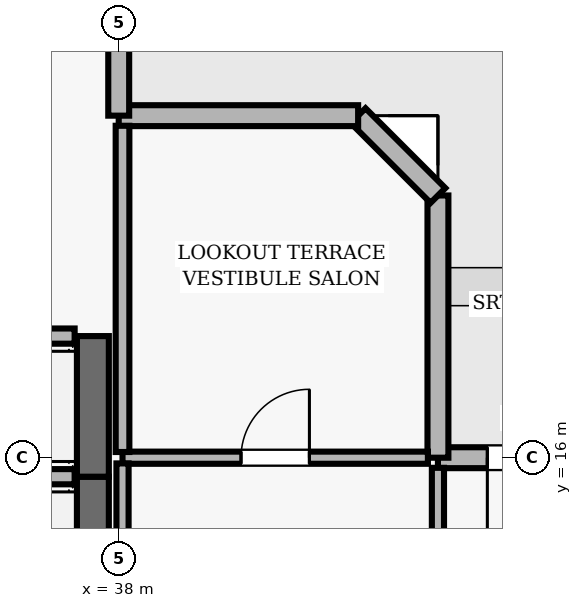
"""IFC4 building model, lengths in metres.
Left out: names, types, materials, properties, quantities, classifications, styles, units other than length and angle.
Written with IfcOpenShell. Run it as: python <this file> out.ifc"""

import sys

from ifc_helpers import new_model, si_unit, direction, frame, frame_2d, origin, place, context, subcontext, project, spatial, rectangle, extrude, element, fill, save


model = new_model("IFC4")
c1 = context("Model", 3, precision=1e-05, world=origin(), true_north=direction((0.0, 1.0)))
c2 = subcontext(c1, "Body", "Model", "MODEL_VIEW")
j1 = project(units=[si_unit("LENGTHUNIT", "METRE"), si_unit("PLANEANGLEUNIT", "RADIAN")], contexts=[c1])
p1 = place(None, origin())
s1 = spatial("IfcSite", under=j1, at=p1, CompositionType="ELEMENT")
p2 = place(p1, origin())
s2 = spatial("IfcBuilding", under=s1, at=p2, CompositionType="ELEMENT")
p3 = place(p2, frame((0.0, 0.0, 311.7)))
s3 = spatial("IfcBuildingStorey", under=s2, at=p3, CompositionType="ELEMENT", Elevation=311.7)
p4 = place(p3, frame((57.3, 16.0, 0.0), z_axis=(0.0, 0.0, 1.0), x_axis=(-1.0, 0.0, 0.0)))
e1 = element("IfcWall", 1, at=p4, inside=s3, PredefinedType="SOLIDWALL", context=c2, shape_type="SweptSolid", body=[
    extrude(rectangle(XDim=15.1, YDim=0.275, at=frame_2d((7.55, 0.0))), origin(), (0.0, 0.0, 1.0), 4.74),
])
p5 = place(p4, frame((7.25, 0.0, 0.0)))
e2 = element("IfcOpeningElement", 2, at=p5, cuts=e1, PredefinedType="OPENING", context=c2, shape_type="SweptSolid", body=[
    extrude(rectangle(XDim=1.0, YDim=2.2, at=frame_2d((0.5, 1.1))), frame((0.0, 0.147, 0.0), z_axis=(0.0, -1.0, 0.0), x_axis=(1.0, 0.0, 0.0)), (0.0, 0.0, 1.0), 0.295),
])
p6 = place(p4, frame((13.1, 0.0, 0.0)))
e3 = element("IfcOpeningElement", 3, at=p6, cuts=e1, PredefinedType="OPENING", context=c2, shape_type="SweptSolid", body=[
    extrude(rectangle(XDim=1.35, YDim=2.2, at=frame_2d((0.675, 1.1))), frame((0.0, 0.147, 0.0), z_axis=(0.0, -1.0, 0.0), x_axis=(1.0, 0.0, 0.0)), (0.0, 0.0, 1.0), 0.295),
])
p7 = place(p4, frame((2.375, 0.0, 0.9)))
e4 = element("IfcOpeningElement", 4, at=p7, cuts=e1, PredefinedType="OPENING", context=c2, shape_type="SweptSolid", body=[
    extrude(rectangle(XDim=2.8, YDim=1.8, at=frame_2d((1.4, 0.9))), frame((0.0, 0.147, 0.0), z_axis=(0.0, -1.0, 0.0), x_axis=(1.0, 0.0, 0.0)), (0.0, 0.0, 1.0), 0.295),
])
p8 = place(p3, frame((42.2, 16.0, 0.0), z_axis=(0.0, 0.0, 1.0), x_axis=(0.0, 1.0, 0.0)))
e5 = element("IfcWall", 5, at=p8, inside=s3, PredefinedType="SOLIDWALL", context=c2, shape_type="SweptSolid", body=[
    extrude(rectangle(XDim=3.45, YDim=0.275, at=frame_2d((1.725, 0.0))), origin(), (0.0, 0.0, 1.0), 4.74),
])
p9 = place(p3, frame((42.2, 19.45, 0.0), z_axis=(0.0, 0.0, 1.0), x_axis=(-0.707106781187, 0.707106781187, 0.0)))
e6 = element("IfcWall", 6, at=p9, inside=s3, PredefinedType="SOLIDWALL", context=c2, shape_type="SweptSolid", body=[
    extrude(rectangle(XDim=1.485, YDim=0.275, at=frame_2d((0.743, 0.0))), origin(), (0.0, 0.0, 1.0), 4.74),
])
p10 = place(p3, frame((41.15, 20.5, 0.0), z_axis=(0.0, 0.0, 1.0), x_axis=(-1.0, 0.0, 0.0)))
e7 = element("IfcWall", 7, at=p10, inside=s3, PredefinedType="SOLIDWALL", context=c2, shape_type="SweptSolid", body=[
    extrude(rectangle(XDim=3.15, YDim=0.275, at=frame_2d((1.575, 0.0))), origin(), (0.0, 0.0, 1.0), 4.74),
])
p11 = place(p3, frame((38.0, 20.5, 0.0), z_axis=(0.0, 0.0, 1.0), x_axis=(0.0, 1.0, 0.0)))
e8 = element("IfcWall", 8, at=p11, inside=s3, PredefinedType="SOLIDWALL", context=c2, shape_type="SweptSolid", body=[
    extrude(rectangle(XDim=14.8, YDim=0.275, at=frame_2d((7.4, 0.0))), origin(), (0.0, 0.0, 1.0), 4.74),
])
p12 = place(p11, frame((6.5, 0.0, 0.0)))
e9 = element("IfcOpeningElement", 9, at=p12, cuts=e8, PredefinedType="OPENING", context=c2, shape_type="SweptSolid", body=[
    extrude(rectangle(XDim=1.0, YDim=2.2, at=frame_2d((0.5, 1.1))), frame((0.0, 0.147, 0.0), z_axis=(0.0, -1.0, 0.0), x_axis=(1.0, 0.0, 0.0)), (0.0, 0.0, 1.0), 0.295),
])
p13 = place(p11, frame((10.5, 0.0, 0.9)))
e10 = element("IfcOpeningElement", 10, at=p13, cuts=e8, PredefinedType="OPENING", context=c2, shape_type="SweptSolid", body=[
    extrude(rectangle(XDim=1.2, YDim=1.6, at=frame_2d((0.6, 0.8))), frame((0.0, 0.147, 0.0), z_axis=(0.0, -1.0, 0.0), x_axis=(1.0, 0.0, 0.0)), (0.0, 0.0, 1.0), 0.295),
])
p14 = place(p3, frame((37.66, 13.9, 0.0), z_axis=(0.0, 0.0, 1.0), x_axis=(0.0, 1.0, 0.0)))
e11 = element("IfcWall", 11, at=p14, inside=s3, PredefinedType="SHEAR", context=c2, shape_type="SweptSolid", body=[
    extrude(rectangle(XDim=1.85, YDim=0.42, at=frame_2d((0.925, 0.0))), origin(), (0.0, 0.0, 1.0), 4.74),
])
p15 = place(p3, frame((37.42, 15.75, 0.0), z_axis=(0.0, 0.0, 1.0), x_axis=(-1.0, 0.0, 0.0)))
e12 = element("IfcWall", 12, at=p15, inside=s3, PredefinedType="SOLIDWALL", context=c2, shape_type="SweptSolid", body=[
    extrude(rectangle(XDim=2.14, YDim=0.2, at=frame_2d((1.07, 0.0))), origin(), (0.0, 0.0, 1.0), 4.74),
])
p16 = place(p3, frame((37.66, 15.75, 0.0), z_axis=(0.0, 0.0, 1.0), x_axis=(0.0, 1.0, 0.0)))
e13 = element("IfcWall", 13, at=p16, inside=s3, PredefinedType="SHEAR", context=c2, shape_type="SweptSolid", body=[
    extrude(rectangle(XDim=1.85, YDim=0.42, at=frame_2d((0.925, 0.0))), origin(), (0.0, 0.0, 1.0), 4.74),
])
p17 = place(p3, frame((37.42, 17.6, 0.0), z_axis=(0.0, 0.0, 1.0), x_axis=(-1.0, 0.0, 0.0)))
e14 = element("IfcWall", 14, at=p17, inside=s3, PredefinedType="SOLIDWALL", context=c2, shape_type="SweptSolid", body=[
    extrude(rectangle(XDim=2.14, YDim=0.2, at=frame_2d((1.07, 0.0))), origin(), (0.0, 0.0, 1.0), 4.74),
])
p18 = place(p3, frame((38.05, 16.0, 0.0), z_axis=(0.0, 0.0, 1.0), x_axis=(1.0, 0.0, 0.0)))
e15 = element("IfcWall", 15, at=p18, inside=s3, PredefinedType="PARTITIONING", context=c2, shape_type="SweptSolid", body=[
    extrude(rectangle(XDim=4.018, YDim=0.16, at=frame_2d((2.009, 0.0))), origin(), (0.0, 0.0, 1.0), 4.74),
])
p19 = place(p18, frame((1.559, 0.0, 0.0)))
e16 = element("IfcOpeningElement", 16, at=p19, cuts=e15, PredefinedType="OPENING", context=c2, shape_type="SweptSolid", body=[
    extrude(rectangle(XDim=0.9, YDim=2.1, at=frame_2d((0.45, 1.05))), frame((0.0, 0.09, 0.0), z_axis=(0.0, -1.0, 0.0), x_axis=(1.0, 0.0, 0.0)), (0.0, 0.0, 1.0), 0.18),
])
p20 = place(p3, frame((38.05, 15.925, 0.0), z_axis=(0.0, 0.0, 1.0), x_axis=(0.0, -1.0, 0.0)))
e17 = element("IfcWall", 17, at=p20, inside=s3, PredefinedType="PARTITIONING", context=c2, shape_type="SweptSolid", body=[
    extrude(rectangle(XDim=6.375, YDim=0.16, at=frame_2d((3.188, 0.0))), origin(), (0.0, 0.0, 1.0), 4.271),
])
p21 = place(p3, frame((38.05, 20.367, 0.0), z_axis=(0.0, 0.0, 1.0), x_axis=(0.0, -1.0, 0.0)))
e18 = element("IfcWall", 18, at=p21, inside=s3, PredefinedType="PARTITIONING", context=c2, shape_type="SweptSolid", body=[
    extrude(rectangle(XDim=4.292, YDim=0.18, at=frame_2d((2.146, 0.0))), origin(), (0.0, 0.0, 1.0), 4.271),
])
p22 = place(p3, frame((42.2, 10.525, 0.0), z_axis=(0.0, 0.0, 1.0), x_axis=(0.0, 1.0, 0.0)))
e19 = element("IfcWall", 19, at=p22, inside=s3, PredefinedType="PARTITIONING", context=c2, shape_type="SweptSolid", body=[
    extrude(rectangle(XDim=5.342, YDim=0.16, at=frame_2d((2.671, 0.0))), origin(), (0.0, 0.0, 1.0), 4.74),
])
p23 = place(p22, frame((2.221, 0.0, 0.0)))
e20 = element("IfcOpeningElement", 20, at=p23, cuts=e19, PredefinedType="OPENING", context=c2, shape_type="SweptSolid", body=[
    extrude(rectangle(XDim=0.9, YDim=2.1, at=frame_2d((0.45, 1.05))), frame((0.0, 0.09, 0.0), z_axis=(0.0, -1.0, 0.0), x_axis=(1.0, 0.0, 0.0)), (0.0, 0.0, 1.0), 0.18),
])
p24 = place(p6, origin())
e21 = element("IfcDoor", 21, at=p24, inside=s3, OperationType="SINGLE_SWING_RIGHT", PredefinedType="DOOR", context=c2, shape_type="SweptSolid", body=[
    extrude(rectangle(XDim=1.35, YDim=2.2, at=frame_2d((0.675, 1.1))), frame((0.0, 0.025, 0.0), z_axis=(0.0, -1.0, 0.0), x_axis=(1.0, 0.0, 0.0)), (0.0, 0.0, 1.0), 0.05),
])
fill(e3, e21)
p25 = place(p19, origin())
e22 = element("IfcDoor", 22, at=p25, inside=s3, OperationType="SINGLE_SWING_RIGHT", PredefinedType="DOOR", context=c2, shape_type="SweptSolid", body=[
    extrude(rectangle(XDim=0.9, YDim=2.1, at=frame_2d((0.45, 1.05))), frame((0.0, 0.025, 0.0), z_axis=(0.0, -1.0, 0.0), x_axis=(1.0, 0.0, 0.0)), (0.0, 0.0, 1.0), 0.05),
])
fill(e16, e22)
save(model, sys.argv[1])
